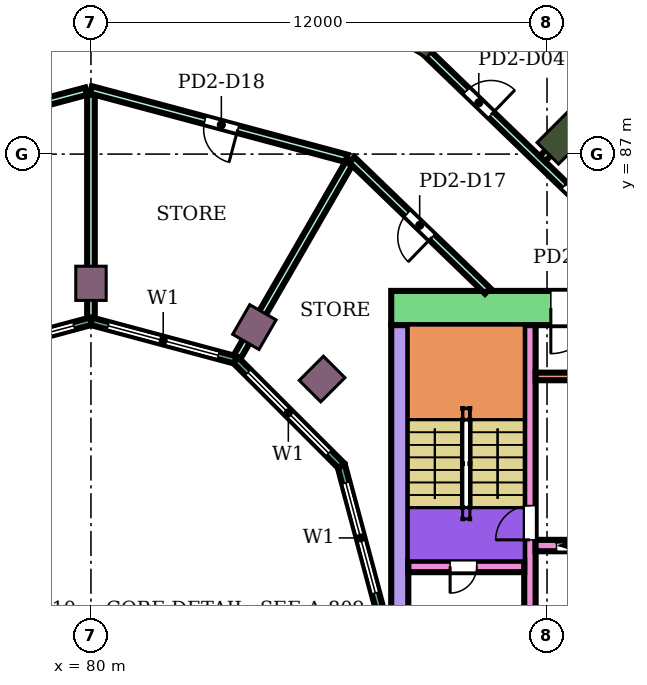
"""IFC4 building model, lengths in metres.
Left out: names, types, materials, properties, quantities, classifications, styles, units other than length and angle.
Written with IfcOpenShell. Run it as: python <this file> out.ifc"""

import sys

from ifc_helpers import new_model, si_unit, direction, frame, frame_2d, origin, origin_2d, place, context, subcontext, project, spatial, rectangle, extrude, element, fill, save


model = new_model("IFC4")
c1 = context("Model", 3, precision=1e-05, world=origin(), true_north=direction((0.0, 1.0)))
c2 = subcontext(c1, "Body", "Model", "MODEL_VIEW")
j1 = project(units=[si_unit("LENGTHUNIT", "METRE"), si_unit("PLANEANGLEUNIT", "RADIAN")], contexts=[c1])
p1 = place(None, origin())
s1 = spatial("IfcSite", under=j1, at=p1, CompositionType="ELEMENT")
p2 = place(p1, origin())
s2 = spatial("IfcBuilding", under=s1, at=p2, CompositionType="ELEMENT")
p3 = place(p2, frame((0.0, 0.0, 12.4)))
s3 = spatial("IfcBuildingStorey", under=s2, at=p3, CompositionType="ELEMENT", Elevation=12.4)
for number, where, z_axis, x_axis in (
    (1, (92.445, 87.445, 0.0), (0.0, 0.0, 1.0), (0.707, 0.707, 0.0)),
    (2, (88.8, 90.242, 0.0), (0.0, 0.0, 1.0), (0.5, 0.866, 0.0)),
):
    element("IfcColumn", number, at=place(p3, frame(where, z_axis=z_axis, x_axis=x_axis)), inside=s3, PredefinedType="COLUMN", context=c2, shape_type="SweptSolid", body=[
        extrude(rectangle(XDim=1.2, YDim=0.8, at=origin_2d()), origin(), (0.0, 0.0, 1.0), 5.4),
    ])
for number, where, z_axis, x_axis in (
    (3, (86.081, 81.081, 0.0), (0.0, 0.0, 1.0), (0.707, 0.707, 0.0)),
    (4, (84.3, 82.448, 0.0), (0.0, 0.0, 1.0), (0.5, 0.866, 0.0)),
    (5, (80.0, 83.6, 0.0), (0.0, 0.0, 1.0), (0.0, 1.0, 0.0)),
):
    element("IfcColumn", number, at=place(p3, frame(where, z_axis=z_axis, x_axis=x_axis)), inside=s3, PredefinedType="COLUMN", context=c2, shape_type="SweptSolid", body=[
        extrude(rectangle(XDim=0.9, YDim=0.8, at=origin_2d()), origin(), (0.0, 0.0, 1.0), 5.4),
    ])
p4 = place(p3, frame((87.9, 82.95, 0.0), z_axis=(0.0, 0.0, 1.0), x_axis=(1.0, 0.0, 0.0)))
e6 = element("IfcWall", 6, at=p4, inside=s3, PredefinedType="SHEAR", context=c2, shape_type="SweptSolid", body=[
    extrude(rectangle(XDim=14.6, YDim=0.9, at=frame_2d((7.3, 0.0))), origin(), (0.0, 0.0, 1.0), 4.95),
])
p5 = place(p4, frame((4.2, 0.0, 0.0)))
e7 = element("IfcOpeningElement", 7, at=p5, cuts=e6, PredefinedType="OPENING", context=c2, shape_type="SweptSolid", body=[
    extrude(rectangle(XDim=2.4, YDim=2.4, at=frame_2d((1.2, 1.2))), frame((0.0, 0.46, 0.0), z_axis=(0.0, -1.0, 0.0), x_axis=(1.0, 0.0, 0.0)), (0.0, 0.0, 1.0), 0.92),
])
p6 = place(p3, frame((88.125, 75.0, 0.0), z_axis=(0.0, 0.0, 1.0), x_axis=(0.0, 1.0, 0.0)))
e8 = element("IfcWall", 8, at=p6, inside=s3, PredefinedType="SHEAR", context=c2, shape_type="SweptSolid", body=[
    extrude(rectangle(XDim=7.5, YDim=0.45, at=frame_2d((3.75, 0.0))), origin(), (0.0, 0.0, 1.0), 4.95),
])
p7 = place(p3, frame((91.55, 75.0, 0.0), z_axis=(0.0, 0.0, 1.0), x_axis=(0.0, 1.0, 0.0)))
e9 = element("IfcWall", 9, at=p7, inside=s3, PredefinedType="SHEAR", context=c2, shape_type="SweptSolid", body=[
    extrude(rectangle(XDim=7.5, YDim=0.3, at=frame_2d((3.75, 0.0))), origin(), (0.0, 0.0, 1.0), 4.95),
])
p8 = place(p7, frame((1.85, 0.0, 0.0)))
e10 = element("IfcOpeningElement", 10, at=p8, cuts=e9, PredefinedType="OPENING", context=c2, shape_type="SweptSolid", body=[
    extrude(rectangle(XDim=0.9, YDim=2.1, at=frame_2d((0.45, 1.05))), frame((0.0, 0.16, 0.0), z_axis=(0.0, -1.0, 0.0), x_axis=(1.0, 0.0, 0.0)), (0.0, 0.0, 1.0), 0.32),
])
p9 = place(p3, frame((88.35, 76.15, 0.0), z_axis=(0.0, 0.0, 1.0), x_axis=(1.0, 0.0, 0.0)))
e11 = element("IfcWall", 11, at=p9, inside=s3, PredefinedType="SHEAR", context=c2, shape_type="SweptSolid", body=[
    extrude(rectangle(XDim=3.05, YDim=0.3, at=frame_2d((1.525, 0.0))), origin(), (0.0, 0.0, 1.0), 4.95),
])
p10 = place(p9, frame((1.1, 0.0, 0.0)))
e12 = element("IfcOpeningElement", 12, at=p10, cuts=e11, PredefinedType="OPENING", context=c2, shape_type="SweptSolid", body=[
    extrude(rectangle(XDim=0.7, YDim=2.0, at=frame_2d((0.35, 1.0))), frame((0.0, 0.16, 0.0), z_axis=(0.0, -1.0, 0.0), x_axis=(1.0, 0.0, 0.0)), (0.0, 0.0, 1.0), 0.32),
])
p11 = place(p3, frame((91.7, 76.7, 0.0), z_axis=(0.0, 0.0, 1.0), x_axis=(1.0, 0.0, 0.0)))
e13 = element("IfcWall", 13, at=p11, inside=s3, PredefinedType="SHEAR", context=c2, shape_type="SweptSolid", body=[
    extrude(rectangle(XDim=10.8, YDim=0.3, at=frame_2d((5.4, 0.0))), origin(), (0.0, 0.0, 1.0), 4.95),
])
p12 = place(p11, frame((0.55, 0.0, 0.0)))
e14 = element("IfcOpeningElement", 14, at=p12, cuts=e13, PredefinedType="OPENING", context=c2, shape_type="SweptSolid", body=[
    extrude(rectangle(XDim=1.1, YDim=2.1, at=frame_2d((0.55, 1.05))), frame((0.0, 0.16, 0.0), z_axis=(0.0, -1.0, 0.0), x_axis=(1.0, 0.0, 0.0)), (0.0, 0.0, 1.0), 0.32),
])
p13 = place(p11, frame((8.1, 0.0, 0.0)))
e15 = element("IfcOpeningElement", 15, at=p13, cuts=e13, PredefinedType="OPENING", context=c2, shape_type="SweptSolid", body=[
    extrude(rectangle(XDim=1.0, YDim=2.1, at=frame_2d((0.5, 1.05))), frame((0.0, 0.16, 0.0), z_axis=(0.0, -1.0, 0.0), x_axis=(1.0, 0.0, 0.0)), (0.0, 0.0, 1.0), 0.32),
])
p14 = place(p3, frame((91.7, 81.15, 0.0), z_axis=(0.0, 0.0, 1.0), x_axis=(1.0, 0.0, 0.0)))
e16 = element("IfcWall", 16, at=p14, inside=s3, PredefinedType="SHEAR", context=c2, shape_type="SweptSolid", body=[
    extrude(rectangle(XDim=4.85, YDim=0.2, at=frame_2d((2.425, 0.0))), origin(), (0.0, 0.0, 1.0), 4.95),
])
p15 = place(p3, frame((87.604, 75.0, 0.0), z_axis=(0.0, 0.0, 1.0), x_axis=(-0.258789828301, 0.965933654434, 0.0)))
e17 = element("IfcWall", 17, at=p15, inside=s3, PredefinedType="NOTDEFINED", context=c2, shape_type="SweptSolid", body=[
    extrude(rectangle(XDim=3.936, YDim=0.2, at=frame_2d((1.968, 0.0))), origin(), (0.0, 0.0, 1.0), 5.4),
])
p16 = place(p15, frame((0.468, 0.0, 0.9)))
e18 = element("IfcOpeningElement", 18, at=p16, cuts=e17, PredefinedType="OPENING", context=c2, shape_type="SweptSolid", body=[
    extrude(rectangle(XDim=3.0, YDim=2.3, at=frame_2d((1.5, 1.15))), frame((0.0, 0.11, 0.0), z_axis=(0.0, -1.0, 0.0), x_axis=(1.0, 0.0, 0.0)), (0.0, 0.0, 1.0), 0.22),
])
p17 = place(p3, frame((86.585, 78.802, 0.0), z_axis=(0.0, 0.0, 1.0), x_axis=(-0.707106781187, 0.707106781187, 0.0)))
e19 = element("IfcWall", 19, at=p17, inside=s3, PredefinedType="NOTDEFINED", context=c2, shape_type="SweptSolid", body=[
    extrude(rectangle(XDim=3.936, YDim=0.2, at=frame_2d((1.968, 0.0))), origin(), (0.0, 0.0, 1.0), 5.4),
])
p18 = place(p17, frame((0.468, 0.0, 0.9)))
e20 = element("IfcOpeningElement", 20, at=p18, cuts=e19, PredefinedType="OPENING", context=c2, shape_type="SweptSolid", body=[
    extrude(rectangle(XDim=3.0, YDim=2.3, at=frame_2d((1.5, 1.15))), frame((0.0, 0.11, 0.0), z_axis=(0.0, -1.0, 0.0), x_axis=(1.0, 0.0, 0.0)), (0.0, 0.0, 1.0), 0.22),
])
p19 = place(p3, frame((83.802, 81.585, 0.0), z_axis=(0.0, 0.0, 1.0), x_axis=(-0.965933654434, 0.258789828301, 0.0)))
e21 = element("IfcWall", 21, at=p19, inside=s3, PredefinedType="NOTDEFINED", context=c2, shape_type="SweptSolid", body=[
    extrude(rectangle(XDim=3.936, YDim=0.2, at=frame_2d((1.968, 0.0))), origin(), (0.0, 0.0, 1.0), 5.4),
])
p20 = place(p19, frame((0.468, 0.0, 0.9)))
e22 = element("IfcOpeningElement", 22, at=p20, cuts=e21, PredefinedType="OPENING", context=c2, shape_type="SweptSolid", body=[
    extrude(rectangle(XDim=3.0, YDim=2.3, at=frame_2d((1.5, 1.15))), frame((0.0, 0.11, 0.0), z_axis=(0.0, -1.0, 0.0), x_axis=(1.0, 0.0, 0.0)), (0.0, 0.0, 1.0), 0.22),
])
p21 = place(p3, frame((80.0, 82.604, 0.0), z_axis=(0.0, 0.0, 1.0), x_axis=(-0.965933654434, -0.258789828301, 0.0)))
e23 = element("IfcWall", 23, at=p21, inside=s3, PredefinedType="NOTDEFINED", context=c2, shape_type="SweptSolid", body=[
    extrude(rectangle(XDim=3.936, YDim=0.2, at=frame_2d((1.968, 0.0))), origin(), (0.0, 0.0, 1.0), 5.4),
])
p22 = place(p21, frame((0.468, 0.0, 0.9)))
e24 = element("IfcOpeningElement", 24, at=p22, cuts=e23, PredefinedType="OPENING", context=c2, shape_type="SweptSolid", body=[
    extrude(rectangle(XDim=3.0, YDim=2.3, at=frame_2d((1.5, 1.15))), frame((0.0, 0.11, 0.0), z_axis=(0.0, -1.0, 0.0), x_axis=(1.0, 0.0, 0.0)), (0.0, 0.0, 1.0), 0.22),
])
p23 = place(p3, frame((73.274, 86.888, 0.0), z_axis=(0.0, 0.0, 1.0), x_axis=(0.965941353683, 0.258761089124, 0.0)))
e25 = element("IfcWall", 25, at=p23, inside=s3, PredefinedType="PARTITIONING", context=c2, shape_type="SweptSolid", body=[
    extrude(rectangle(XDim=6.833, YDim=0.2, at=frame_2d((3.417, 0.0))), origin(), (0.0, 0.0, 1.0), 4.95),
])
p24 = place(p23, frame((2.961, 0.0, 0.0)))
e26 = element("IfcOpeningElement", 26, at=p24, cuts=e25, PredefinedType="OPENING", context=c2, shape_type="SweptSolid", body=[
    extrude(rectangle(XDim=0.9, YDim=2.1, at=frame_2d((0.45, 1.05))), frame((0.0, 0.11, 0.0), z_axis=(0.0, -1.0, 0.0), x_axis=(1.0, 0.0, 0.0)), (0.0, 0.0, 1.0), 0.22),
])
p25 = place(p3, frame((80.0, 82.699, 0.0), z_axis=(0.0, 0.0, 1.0), x_axis=(0.0, 1.0, 0.0)))
e27 = element("IfcWall", 27, at=p25, inside=s3, PredefinedType="PARTITIONING", context=c2, shape_type="SweptSolid", body=[
    extrude(rectangle(XDim=5.861, YDim=0.2, at=frame_2d((2.931, 0.0))), origin(), (0.0, 0.0, 1.0), 4.95),
])
p26 = place(p3, frame((80.0, 88.69, 0.0), z_axis=(0.0, 0.0, 1.0), x_axis=(0.965929896633, -0.258803853893, 0.0)))
e28 = element("IfcWall", 28, at=p26, inside=s3, PredefinedType="PARTITIONING", context=c2, shape_type="SweptSolid", body=[
    extrude(rectangle(XDim=6.963, YDim=0.2, at=frame_2d((3.481, 0.0))), origin(), (0.0, 0.0, 1.0), 4.95),
])
p27 = place(p26, frame((3.102, 0.0, 0.0)))
e29 = element("IfcOpeningElement", 29, at=p27, cuts=e28, PredefinedType="OPENING", context=c2, shape_type="SweptSolid", body=[
    extrude(rectangle(XDim=0.9, YDim=2.1, at=frame_2d((0.45, 1.05))), frame((0.0, 0.11, 0.0), z_axis=(0.0, -1.0, 0.0), x_axis=(1.0, 0.0, 0.0)), (0.0, 0.0, 1.0), 0.22),
])
p28 = place(p3, frame((83.85, 81.667, 0.0), z_axis=(0.0, 0.0, 1.0), x_axis=(0.500029580911, 0.866008324564, 0.0)))
e30 = element("IfcWall", 30, at=p28, inside=s3, PredefinedType="PARTITIONING", context=c2, shape_type="SweptSolid", body=[
    extrude(rectangle(XDim=5.872, YDim=0.2, at=frame_2d((2.936, 0.0))), origin(), (0.0, 0.0, 1.0), 4.95),
])
p29 = place(p3, frame((86.861, 86.852, 0.0), z_axis=(0.0, 0.0, 1.0), x_axis=(0.719448855188, -0.694545423114, 0.0)))
e31 = element("IfcWall", 31, at=p29, inside=s3, PredefinedType="PARTITIONING", context=c2, shape_type="SweptSolid", body=[
    extrude(rectangle(XDim=4.97, YDim=0.2, at=frame_2d((2.485, 0.0))), origin(), (0.0, 0.0, 1.0), 4.95),
])
p30 = place(p29, frame((2.035, 0.0, 0.0)))
e32 = element("IfcOpeningElement", 32, at=p30, cuts=e31, PredefinedType="OPENING", context=c2, shape_type="SweptSolid", body=[
    extrude(rectangle(XDim=0.9, YDim=2.1, at=frame_2d((0.45, 1.05))), frame((0.0, 0.11, 0.0), z_axis=(0.0, -1.0, 0.0), x_axis=(1.0, 0.0, 0.0)), (0.0, 0.0, 1.0), 0.22),
])
p31 = place(p3, frame((88.668, 89.832, 0.0), z_axis=(0.0, 0.0, 1.0), x_axis=(0.71956091863, -0.694429322811, 0.0)))
e33 = element("IfcWall", 33, at=p31, inside=s3, PredefinedType="PARTITIONING", context=c2, shape_type="SweptSolid", body=[
    extrude(rectangle(XDim=7.043, YDim=0.2, at=frame_2d((3.521, 0.0))), origin(), (0.0, 0.0, 1.0), 4.95),
])
p32 = place(p31, frame((5.271, 0.0, 0.0)))
e34 = element("IfcOpeningElement", 34, at=p32, cuts=e33, PredefinedType="OPENING", context=c2, shape_type="SweptSolid", body=[
    extrude(rectangle(XDim=0.9, YDim=2.1, at=frame_2d((0.45, 1.05))), frame((0.0, 0.11, 0.0), z_axis=(0.0, -1.0, 0.0), x_axis=(1.0, 0.0, 0.0)), (0.0, 0.0, 1.0), 0.22),
])
p33 = place(p31, frame((1.684, 0.0, 0.0)))
e35 = element("IfcOpeningElement", 35, at=p33, cuts=e33, PredefinedType="OPENING", context=c2, shape_type="SweptSolid", body=[
    extrude(rectangle(XDim=0.9, YDim=2.1, at=frame_2d((0.45, 1.05))), frame((0.0, 0.11, 0.0), z_axis=(0.0, -1.0, 0.0), x_axis=(1.0, 0.0, 0.0)), (0.0, 0.0, 1.0), 0.22),
])
p34 = place(p3, frame((91.876, 86.876, 0.0), z_axis=(0.0, 0.0, 1.0), x_axis=(0.707106781187, 0.707106781187, 0.0)))
e36 = element("IfcWall", 36, at=p34, inside=s3, PredefinedType="PARTITIONING", context=c2, shape_type="SweptSolid", body=[
    extrude(rectangle(XDim=19.004, YDim=0.2, at=frame_2d((9.502, 0.0))), origin(), (0.0, 0.0, 1.0), 3.75),
])
p35 = place(p3, frame((90.536, 93.034, 0.0), z_axis=(0.0, 0.0, 1.0), x_axis=(0.719550314706, -0.694440310327, 0.0)))
e37 = element("IfcWall", 37, at=p35, inside=s3, PredefinedType="PARTITIONING", context=c2, shape_type="SweptSolid", body=[
    extrude(rectangle(XDim=13.875, YDim=0.1, at=frame_2d((6.937, 0.0))), origin(), (0.0, 0.0, 1.0), 4.95),
])
p36 = place(p35, frame((10.763, 0.0, 0.0)))
e38 = element("IfcOpeningElement", 38, at=p36, cuts=e37, PredefinedType="OPENING", context=c2, shape_type="SweptSolid", body=[
    extrude(rectangle(XDim=0.9, YDim=2.1, at=frame_2d((0.45, 1.05))), frame((0.0, 0.06, 0.0), z_axis=(0.0, -1.0, 0.0), x_axis=(1.0, 0.0, 0.0)), (0.0, 0.0, 1.0), 0.12),
])
p37 = place(p35, frame((6.648, 0.0, 0.0)))
e39 = element("IfcOpeningElement", 39, at=p37, cuts=e37, PredefinedType="OPENING", context=c2, shape_type="SweptSolid", body=[
    extrude(rectangle(XDim=0.9, YDim=2.1, at=frame_2d((0.45, 1.05))), frame((0.0, 0.06, 0.0), z_axis=(0.0, -1.0, 0.0), x_axis=(1.0, 0.0, 0.0)), (0.0, 0.0, 1.0), 0.12),
])
p38 = place(p35, frame((2.146, 0.0, 0.0)))
e40 = element("IfcOpeningElement", 40, at=p38, cuts=e37, PredefinedType="OPENING", context=c2, shape_type="SweptSolid", body=[
    extrude(rectangle(XDim=0.9, YDim=2.1, at=frame_2d((0.45, 1.05))), frame((0.0, 0.06, 0.0), z_axis=(0.0, -1.0, 0.0), x_axis=(1.0, 0.0, 0.0)), (0.0, 0.0, 1.0), 0.12),
])
p39 = place(p16, origin())
e41 = element("IfcWindow", 41, at=p39, inside=s3, PartitioningType="SINGLE_PANEL", PredefinedType="WINDOW", context=c2, shape_type="SweptSolid", body=[
    extrude(rectangle(XDim=3.0, YDim=2.3, at=frame_2d((1.5, 1.15))), frame((0.0, 0.03, 0.0), z_axis=(0.0, -1.0, 0.0), x_axis=(1.0, 0.0, 0.0)), (0.0, 0.0, 1.0), 0.06),
])
fill(e18, e41)
p40 = place(p18, origin())
e42 = element("IfcWindow", 42, at=p40, inside=s3, PartitioningType="SINGLE_PANEL", PredefinedType="WINDOW", context=c2, shape_type="SweptSolid", body=[
    extrude(rectangle(XDim=3.0, YDim=2.3, at=frame_2d((1.5, 1.15))), frame((0.0, 0.03, 0.0), z_axis=(0.0, -1.0, 0.0), x_axis=(1.0, 0.0, 0.0)), (0.0, 0.0, 1.0), 0.06),
])
fill(e20, e42)
p41 = place(p20, origin())
e43 = element("IfcWindow", 43, at=p41, inside=s3, PartitioningType="SINGLE_PANEL", PredefinedType="WINDOW", context=c2, shape_type="SweptSolid", body=[
    extrude(rectangle(XDim=3.0, YDim=2.3, at=frame_2d((1.5, 1.15))), frame((0.0, 0.03, 0.0), z_axis=(0.0, -1.0, 0.0), x_axis=(1.0, 0.0, 0.0)), (0.0, 0.0, 1.0), 0.06),
])
fill(e22, e43)
p42 = place(p22, origin())
e44 = element("IfcWindow", 44, at=p42, inside=s3, PartitioningType="SINGLE_PANEL", PredefinedType="WINDOW", context=c2, shape_type="SweptSolid", body=[
    extrude(rectangle(XDim=3.0, YDim=2.3, at=frame_2d((1.5, 1.15))), frame((0.0, 0.03, 0.0), z_axis=(0.0, -1.0, 0.0), x_axis=(1.0, 0.0, 0.0)), (0.0, 0.0, 1.0), 0.06),
])
fill(e24, e44)
p43 = place(p32, origin())
e45 = element("IfcDoor", 45, at=p43, inside=s3, OperationType="SINGLE_SWING_LEFT", PredefinedType="DOOR", context=c2, shape_type="SweptSolid", body=[
    extrude(rectangle(XDim=0.9, YDim=2.1, at=frame_2d((0.45, 1.05))), frame((0.0, 0.025, 0.0), z_axis=(0.0, -1.0, 0.0), x_axis=(1.0, 0.0, 0.0)), (0.0, 0.0, 1.0), 0.05),
])
fill(e34, e45)
p44 = place(p33, origin())
e46 = element("IfcDoor", 46, at=p44, inside=s3, OperationType="SINGLE_SWING_RIGHT", PredefinedType="DOOR", context=c2, shape_type="SweptSolid", body=[
    extrude(rectangle(XDim=0.9, YDim=2.1, at=frame_2d((0.45, 1.05))), frame((0.0, 0.025, 0.0), z_axis=(0.0, -1.0, 0.0), x_axis=(1.0, 0.0, 0.0)), (0.0, 0.0, 1.0), 0.05),
])
fill(e35, e46)
p45 = place(p30, frame((0.9, 0.0, 0.0), z_axis=(0.0, 0.0, 1.0), x_axis=(-1.0, 0.0, 0.0)))
e47 = element("IfcDoor", 47, at=p45, inside=s3, OperationType="SINGLE_SWING_LEFT", PredefinedType="DOOR", context=c2, shape_type="SweptSolid", body=[
    extrude(rectangle(XDim=0.9, YDim=2.1, at=frame_2d((0.45, 1.05))), frame((0.0, 0.025, 0.0), z_axis=(0.0, -1.0, 0.0), x_axis=(1.0, 0.0, 0.0)), (0.0, 0.0, 1.0), 0.05),
])
fill(e32, e47)
p46 = place(p27, frame((0.9, 0.0, 0.0), z_axis=(0.0, 0.0, 1.0), x_axis=(-1.0, 0.0, 0.0)))
e48 = element("IfcDoor", 48, at=p46, inside=s3, OperationType="SINGLE_SWING_LEFT", PredefinedType="DOOR", context=c2, shape_type="SweptSolid", body=[
    extrude(rectangle(XDim=0.9, YDim=2.1, at=frame_2d((0.45, 1.05))), frame((0.0, 0.025, 0.0), z_axis=(0.0, -1.0, 0.0), x_axis=(1.0, 0.0, 0.0)), (0.0, 0.0, 1.0), 0.05),
])
fill(e29, e48)
p47 = place(p10, frame((0.7, 0.0, 0.0), z_axis=(0.0, 0.0, 1.0), x_axis=(-1.0, 0.0, 0.0)))
e49 = element("IfcDoor", 49, at=p47, inside=s3, OperationType="SINGLE_SWING_RIGHT", PredefinedType="DOOR", context=c2, shape_type="SweptSolid", body=[
    extrude(rectangle(XDim=0.7, YDim=2.0, at=frame_2d((0.35, 1.0))), frame((0.0, 0.025, 0.0), z_axis=(0.0, -1.0, 0.0), x_axis=(1.0, 0.0, 0.0)), (0.0, 0.0, 1.0), 0.05),
])
fill(e12, e49)
p48 = place(p8, origin())
e50 = element("IfcDoor", 50, at=p48, inside=s3, OperationType="SINGLE_SWING_LEFT", PredefinedType="DOOR", context=c2, shape_type="SweptSolid", body=[
    extrude(rectangle(XDim=0.9, YDim=2.1, at=frame_2d((0.45, 1.05))), frame((0.0, 0.025, 0.0), z_axis=(0.0, -1.0, 0.0), x_axis=(1.0, 0.0, 0.0)), (0.0, 0.0, 1.0), 0.05),
])
fill(e10, e50)
p49 = place(p12, origin())
e51 = element("IfcDoor", 51, at=p49, inside=s3, OperationType="DOUBLE_DOOR_SLIDING", PredefinedType="DOOR", context=c2, shape_type="SweptSolid", body=[
    extrude(rectangle(XDim=1.1, YDim=2.1, at=frame_2d((0.55, 1.05))), frame((0.0, 0.025, 0.0), z_axis=(0.0, -1.0, 0.0), x_axis=(1.0, 0.0, 0.0)), (0.0, 0.0, 1.0), 0.05),
])
fill(e14, e51)
p50 = place(p5, frame((2.4, 0.0, 0.0), z_axis=(0.0, 0.0, 1.0), x_axis=(-1.0, 0.0, 0.0)))
e52 = element("IfcDoor", 52, at=p50, inside=s3, OperationType="DOUBLE_DOOR_SINGLE_SWING", PredefinedType="DOOR", context=c2, shape_type="SweptSolid", body=[
    extrude(rectangle(XDim=2.4, YDim=2.4, at=frame_2d((1.2, 1.2))), frame((0.0, 0.025, 0.0), z_axis=(0.0, -1.0, 0.0), x_axis=(1.0, 0.0, 0.0)), (0.0, 0.0, 1.0), 0.05),
])
fill(e7, e52)
save(model, sys.argv[1])
